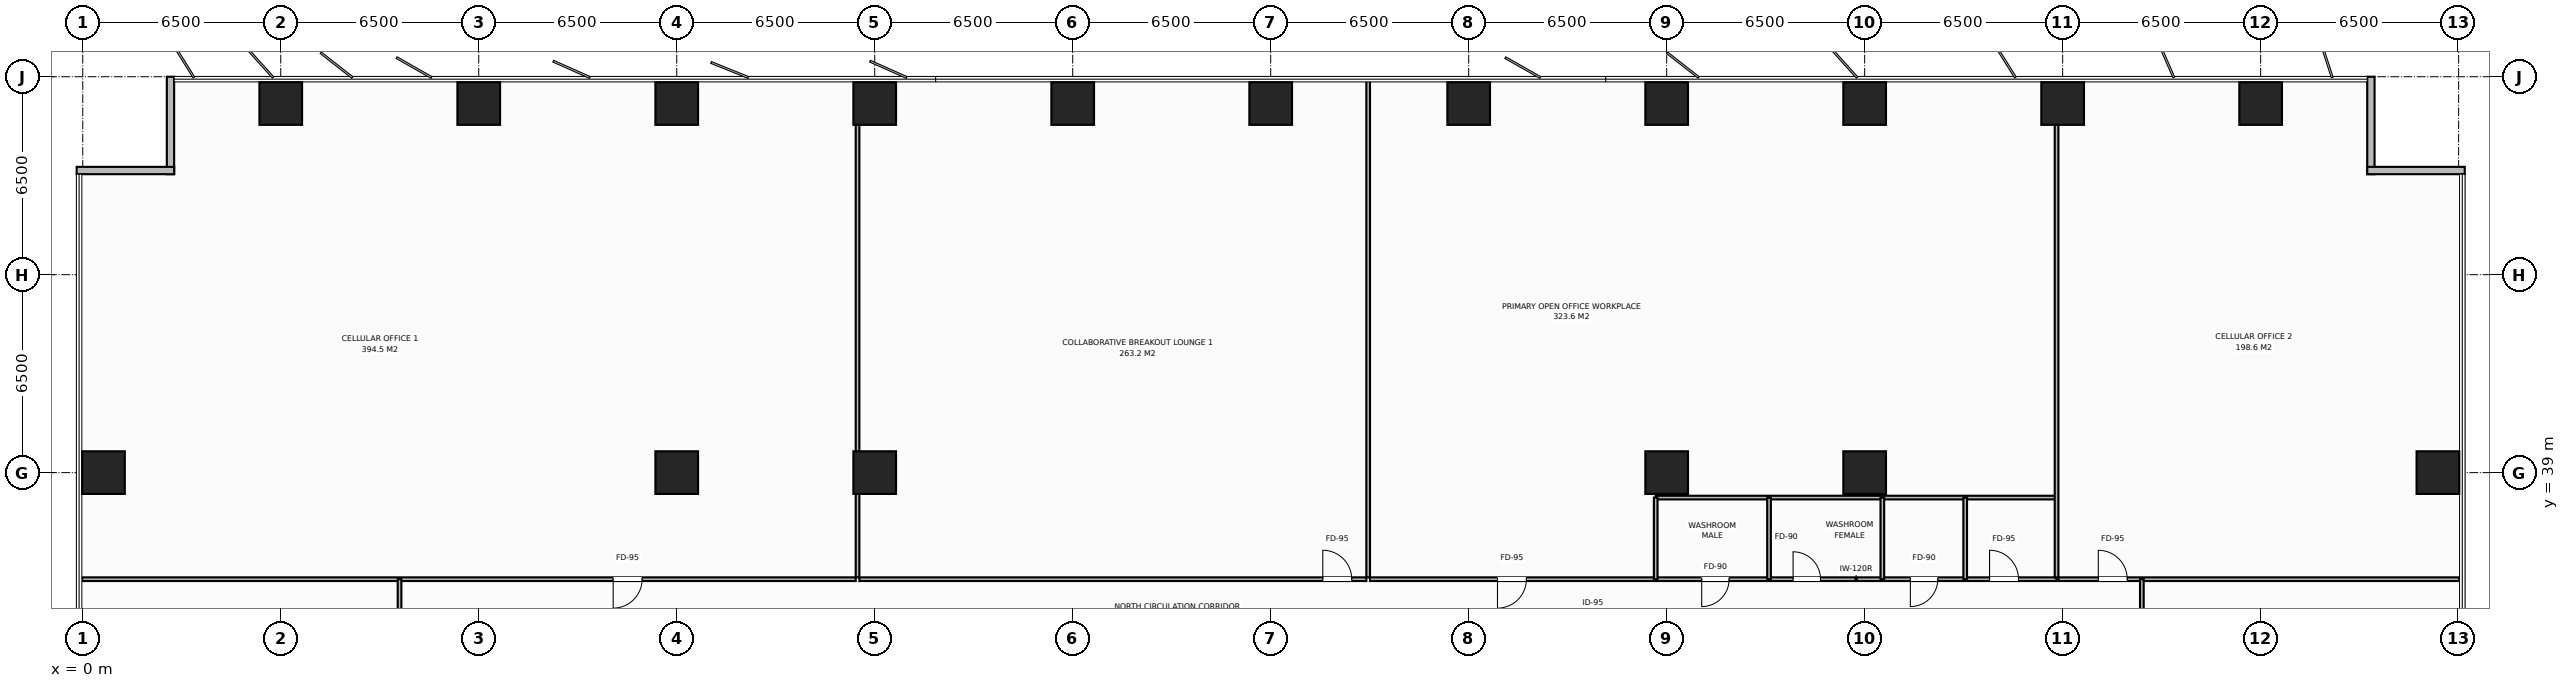
"""IFC4 building model, lengths in metres.
Left out: names, types, materials, properties, quantities, classifications, styles, units other than length and angle.
Written with IfcOpenShell. Run it as: python <this file> out.ifc"""

import sys

from ifc_helpers import new_model, si_unit, direction, frame, frame_2d, origin, origin_2d, place, context, subcontext, project, spatial, rectangle, extrude, element, fill, save


model = new_model("IFC4")
c1 = context("Model", 3, precision=1e-05, world=origin(), true_north=direction((0.0, 1.0)))
c2 = subcontext(c1, "Body", "Model", "MODEL_VIEW")
j1 = project(units=[si_unit("LENGTHUNIT", "METRE"), si_unit("PLANEANGLEUNIT", "RADIAN")], contexts=[c1])
p1 = place(None, origin())
s1 = spatial("IfcSite", under=j1, at=p1, CompositionType="ELEMENT")
p2 = place(p1, origin())
s2 = spatial("IfcBuilding", under=s1, at=p2, CompositionType="ELEMENT")
p3 = place(p2, frame((0.0, 0.0, 50.6)))
s3 = spatial("IfcBuildingStorey", under=s2, at=p3, CompositionType="ELEMENT", Elevation=50.6)
for number, where, z_axis, x_axis in (
    (1, (19.5, 39.0, 0.0), (0.0, 0.0, 1.0), (1.0, 0.0, 0.0)),
    (2, (58.5, 39.0, 0.0), (0.0, 0.0, 1.0), (1.0, 0.0, 0.0)),
    (3, (26.0, 39.0, 0.0), (0.0, 0.0, 1.0), (1.0, 0.0, 0.0)),
    (4, (52.0, 39.0, 0.0), (0.0, 0.0, 1.0), (1.0, 0.0, 0.0)),
    (5, (6.5, 51.12, 0.0), (0.0, 0.0, 1.0), (1.0, 0.0, 0.0)),
    (6, (13.0, 51.12, 0.0), (0.0, 0.0, 1.0), (1.0, 0.0, 0.0)),
    (7, (19.5, 51.12, 0.0), (0.0, 0.0, 1.0), (1.0, 0.0, 0.0)),
    (8, (26.0, 51.12, 0.0), (0.0, 0.0, 1.0), (1.0, 0.0, 0.0)),
    (9, (32.5, 51.12, 0.0), (0.0, 0.0, 1.0), (1.0, 0.0, 0.0)),
    (10, (39.0, 51.12, 0.0), (0.0, 0.0, 1.0), (1.0, 0.0, 0.0)),
    (11, (45.5, 51.12, 0.0), (0.0, 0.0, 1.0), (1.0, 0.0, 0.0)),
    (12, (52.0, 51.12, 0.0), (0.0, 0.0, 1.0), (1.0, 0.0, 0.0)),
    (13, (58.5, 51.12, 0.0), (0.0, 0.0, 1.0), (1.0, 0.0, 0.0)),
    (14, (65.0, 51.12, 0.0), (0.0, 0.0, 1.0), (1.0, 0.0, 0.0)),
    (15, (71.5, 51.12, 0.0), (0.0, 0.0, 1.0), (1.0, 0.0, 0.0)),
    (16, (0.68, 39.0, 0.0), (0.0, 0.0, 1.0), (1.0, 0.0, 0.0)),
    (17, (77.32, 39.0, 0.0), (0.0, 0.0, 1.0), (1.0, 0.0, 0.0)),
):
    element("IfcColumn", number, at=place(p3, frame(where, z_axis=z_axis, x_axis=x_axis)), inside=s3, PredefinedType="COLUMN", context=c2, shape_type="SweptSolid", body=[
        extrude(rectangle(XDim=1.4, YDim=1.4, at=origin_2d()), origin(), (0.0, 0.0, 1.0), 3.8),
    ])
for number, where, z_axis, x_axis in (
    (18, (2.88, 48.8, 0.0), (0.0, 0.0, 1.0), (0.0, 1.0, 0.0)),
    (19, (-0.2, 48.92, 0.0), (0.0, 0.0, 1.0), (1.0, 0.0, 0.0)),
    (20, (75.12, 52.0, 0.0), (0.0, 0.0, 1.0), (0.0, -1.0, 0.0)),
    (21, (75.0, 48.92, 0.0), (0.0, 0.0, 1.0), (1.0, 0.0, 0.0)),
):
    element("IfcWall", number, at=place(p3, frame(where, z_axis=z_axis, x_axis=x_axis)), inside=s3, PredefinedType="STANDARD", context=c2, shape_type="SweptSolid", body=[
        extrude(rectangle(XDim=3.2, YDim=0.24, at=frame_2d((1.6, 0.0))), origin(), (0.0, 0.0, 1.0), 3.55),
    ])
p4 = place(p3, frame((51.64, 35.5, 0.0), z_axis=(0.0, 0.0, 1.0), x_axis=(1.0, 0.0, 0.0)))
e22 = element("IfcWall", 22, at=p4, inside=s3, PredefinedType="PARTITIONING", context=c2, shape_type="SweptSolid", body=[
    extrude(rectangle(XDim=13.16, YDim=0.12, at=frame_2d((6.58, 0.0))), origin(), (0.0, 0.0, 1.0), 3.55),
])
p5 = place(p4, frame((1.51, 0.0, 0.0)))
e23 = element("IfcOpeningElement", 23, at=p5, cuts=e22, PredefinedType="OPENING", context=c2, shape_type="SweptSolid", body=[
    extrude(rectangle(XDim=0.9, YDim=2.15, at=frame_2d((0.45, 1.075))), frame((0.0, 0.07, 0.0), z_axis=(0.0, -1.0, 0.0), x_axis=(1.0, 0.0, 0.0)), (0.0, 0.0, 1.0), 0.14),
])
p6 = place(p4, frame((4.51, 0.0, 0.0)))
e24 = element("IfcOpeningElement", 24, at=p6, cuts=e22, PredefinedType="OPENING", context=c2, shape_type="SweptSolid", body=[
    extrude(rectangle(XDim=0.9, YDim=2.15, at=frame_2d((0.45, 1.075))), frame((0.0, 0.07, 0.0), z_axis=(0.0, -1.0, 0.0), x_axis=(1.0, 0.0, 0.0)), (0.0, 0.0, 1.0), 0.14),
])
p7 = place(p4, frame((8.36, 0.0, 0.0)))
e25 = element("IfcOpeningElement", 25, at=p7, cuts=e22, PredefinedType="OPENING", context=c2, shape_type="SweptSolid", body=[
    extrude(rectangle(XDim=0.9, YDim=2.15, at=frame_2d((0.45, 1.075))), frame((0.0, 0.07, 0.0), z_axis=(0.0, -1.0, 0.0), x_axis=(1.0, 0.0, 0.0)), (0.0, 0.0, 1.0), 0.14),
])
p8 = place(p4, frame((10.96, 0.0, 0.0)))
e26 = element("IfcOpeningElement", 26, at=p8, cuts=e22, PredefinedType="OPENING", context=c2, shape_type="SweptSolid", body=[
    extrude(rectangle(XDim=0.95, YDim=2.15, at=frame_2d((0.475, 1.075))), frame((0.0, 0.07, 0.0), z_axis=(0.0, -1.0, 0.0), x_axis=(1.0, 0.0, 0.0)), (0.0, 0.0, 1.0), 0.14),
])
p9 = place(p3, frame((51.64, 38.18, 0.0), z_axis=(0.0, 0.0, 1.0), x_axis=(1.0, 0.0, 0.0)))
e27 = element("IfcWall", 27, at=p9, inside=s3, PredefinedType="PARTITIONING", context=c2, shape_type="SweptSolid", body=[
    extrude(rectangle(XDim=13.16, YDim=0.12, at=frame_2d((6.58, 0.0))), origin(), (0.0, 0.0, 1.0), 3.55),
])
for number, where, z_axis, x_axis in (
    (28, (51.64, 35.5, 0.0), (0.0, 0.0, 1.0), (0.0, 1.0, 0.0)),
    (29, (55.36, 35.5, 0.0), (0.0, 0.0, 1.0), (0.0, 1.0, 0.0)),
    (30, (59.08, 35.5, 0.0), (0.0, 0.0, 1.0), (0.0, 1.0, 0.0)),
    (31, (61.8, 35.5, 0.0), (0.0, 0.0, 1.0), (0.0, 1.0, 0.0)),
):
    element("IfcWall", number, at=place(p3, frame(where, z_axis=z_axis, x_axis=x_axis)), inside=s3, PredefinedType="PARTITIONING", context=c2, shape_type="SweptSolid", body=[
        extrude(rectangle(XDim=2.68, YDim=0.12, at=frame_2d((1.34, 0.0))), origin(), (0.0, 0.0, 1.0), 3.55),
    ])
p10 = place(p3, frame((25.436, 35.56, 0.0), z_axis=(0.0, 0.0, 1.0), x_axis=(0.0, 1.0, 0.0)))
e32 = element("IfcWall", 32, at=p10, inside=s3, PredefinedType="PARTITIONING", context=c2, shape_type="SweptSolid", body=[
    extrude(rectangle(XDim=16.42, YDim=0.12, at=frame_2d((8.21, 0.0))), origin(), (0.0, 0.0, 1.0), 3.55),
])
p11 = place(p3, frame((-0.02, 35.5, 0.0), z_axis=(0.0, 0.0, 1.0), x_axis=(1.0, 0.0, 0.0)))
e33 = element("IfcWall", 33, at=p11, inside=s3, PredefinedType="PARTITIONING", context=c2, shape_type="SweptSolid", body=[
    extrude(rectangle(XDim=25.396, YDim=0.12, at=frame_2d((12.698, 0.0))), origin(), (0.0, 0.0, 1.0), 3.55),
])
p12 = place(p11, frame((17.433, 0.0, 0.0)))
e34 = element("IfcOpeningElement", 34, at=p12, cuts=e33, PredefinedType="OPENING", context=c2, shape_type="SweptSolid", body=[
    extrude(rectangle(XDim=0.95, YDim=2.15, at=frame_2d((0.475, 1.075))), frame((0.0, 0.07, 0.0), z_axis=(0.0, -1.0, 0.0), x_axis=(1.0, 0.0, 0.0)), (0.0, 0.0, 1.0), 0.14),
])
p13 = place(p3, frame((42.2, 35.56, 0.0), z_axis=(0.0, 0.0, 1.0), x_axis=(0.0, 1.0, 0.0)))
e35 = element("IfcWall", 35, at=p13, inside=s3, PredefinedType="PARTITIONING", context=c2, shape_type="SweptSolid", body=[
    extrude(rectangle(XDim=16.42, YDim=0.12, at=frame_2d((8.21, 0.0))), origin(), (0.0, 0.0, 1.0), 3.55),
])
p14 = place(p3, frame((25.496, 35.5, 0.0), z_axis=(0.0, 0.0, 1.0), x_axis=(1.0, 0.0, 0.0)))
e36 = element("IfcWall", 36, at=p14, inside=s3, PredefinedType="PARTITIONING", context=c2, shape_type="SweptSolid", body=[
    extrude(rectangle(XDim=16.644, YDim=0.12, at=frame_2d((8.322, 0.0))), origin(), (0.0, 0.0, 1.0), 3.55),
])
p15 = place(p14, frame((15.214, 0.0, 0.0)))
e37 = element("IfcOpeningElement", 37, at=p15, cuts=e36, PredefinedType="OPENING", context=c2, shape_type="SweptSolid", body=[
    extrude(rectangle(XDim=0.95, YDim=2.15, at=frame_2d((0.475, 1.075))), frame((0.0, 0.07, 0.0), z_axis=(0.0, -1.0, 0.0), x_axis=(1.0, 0.0, 0.0)), (0.0, 0.0, 1.0), 0.14),
])
p16 = place(p3, frame((64.8, 35.56, 0.0), z_axis=(0.0, 0.0, 1.0), x_axis=(0.0, 1.0, 0.0)))
e38 = element("IfcWall", 38, at=p16, inside=s3, PredefinedType="PARTITIONING", context=c2, shape_type="SweptSolid", body=[
    extrude(rectangle(XDim=16.42, YDim=0.12, at=frame_2d((8.21, 0.0))), origin(), (0.0, 0.0, 1.0), 2.9),
])
p17 = place(p3, frame((42.26, 35.5, 0.0), z_axis=(0.0, 0.0, 1.0), x_axis=(1.0, 0.0, 0.0)))
e39 = element("IfcWall", 39, at=p17, inside=s3, PredefinedType="PARTITIONING", context=c2, shape_type="SweptSolid", body=[
    extrude(rectangle(XDim=9.32, YDim=0.12, at=frame_2d((4.66, 0.0))), origin(), (0.0, 0.0, 1.0), 3.55),
])
p18 = place(p17, frame((4.185, 0.0, 0.0)))
e40 = element("IfcOpeningElement", 40, at=p18, cuts=e39, PredefinedType="OPENING", context=c2, shape_type="SweptSolid", body=[
    extrude(rectangle(XDim=0.95, YDim=2.15, at=frame_2d((0.475, 1.075))), frame((0.0, 0.07, 0.0), z_axis=(0.0, -1.0, 0.0), x_axis=(1.0, 0.0, 0.0)), (0.0, 0.0, 1.0), 0.14),
])
p19 = place(p3, frame((64.86, 35.5, 0.0), z_axis=(0.0, 0.0, 1.0), x_axis=(1.0, 0.0, 0.0)))
e41 = element("IfcWall", 41, at=p19, inside=s3, PredefinedType="PARTITIONING", context=c2, shape_type="SweptSolid", body=[
    extrude(rectangle(XDim=13.16, YDim=0.12, at=frame_2d((6.58, 0.0))), origin(), (0.0, 0.0, 1.0), 3.55),
])
p20 = place(p19, frame((1.31, 0.0, 0.0)))
e42 = element("IfcOpeningElement", 42, at=p20, cuts=e41, PredefinedType="OPENING", context=c2, shape_type="SweptSolid", body=[
    extrude(rectangle(XDim=0.95, YDim=2.15, at=frame_2d((0.475, 1.075))), frame((0.0, 0.07, 0.0), z_axis=(0.0, -1.0, 0.0), x_axis=(1.0, 0.0, 0.0)), (0.0, 0.0, 1.0), 0.14),
])
p21 = place(p3, frame((10.4, 29.167, 0.0), z_axis=(0.0, 0.0, 1.0), x_axis=(0.0, 1.0, 0.0)))
e43 = element("IfcWall", 43, at=p21, inside=s3, PredefinedType="PARTITIONING", context=c2, shape_type="SweptSolid", body=[
    extrude(rectangle(XDim=6.333, YDim=0.12, at=frame_2d((3.167, 0.0))), origin(), (0.0, 0.0, 1.0), 3.55),
])
p22 = place(p21, frame((1.642, 0.0, 0.0)))
e44 = element("IfcOpeningElement", 44, at=p22, cuts=e43, PredefinedType="OPENING", context=c2, shape_type="SweptSolid", body=[
    extrude(rectangle(XDim=0.95, YDim=2.15, at=frame_2d((0.475, 1.075))), frame((0.0, 0.07, 0.0), z_axis=(0.0, -1.0, 0.0), x_axis=(1.0, 0.0, 0.0)), (0.0, 0.0, 1.0), 0.14),
])
p23 = place(p3, frame((67.6, 16.5, 0.0), z_axis=(0.0, 0.0, 1.0), x_axis=(0.0, 1.0, 0.0)))
e45 = element("IfcWall", 45, at=p23, inside=s3, PredefinedType="PARTITIONING", context=c2, shape_type="SweptSolid", body=[
    extrude(rectangle(XDim=19.0, YDim=0.12, at=frame_2d((9.5, 0.0))), origin(), (0.0, 0.0, 1.0), 3.55),
])
p24 = place(p23, frame((9.025, 0.0, 0.0)))
e46 = element("IfcOpeningElement", 46, at=p24, cuts=e45, PredefinedType="OPENING", context=c2, shape_type="SweptSolid", body=[
    extrude(rectangle(XDim=0.95, YDim=2.15, at=frame_2d((0.475, 1.075))), frame((0.0, 0.07, 0.0), z_axis=(0.0, -1.0, 0.0), x_axis=(1.0, 0.0, 0.0)), (0.0, 0.0, 1.0), 0.14),
])
p25 = place(p5, origin())
e47 = element("IfcDoor", 47, at=p25, inside=s3, OperationType="SINGLE_SWING_RIGHT", PredefinedType="DOOR", context=c2, shape_type="SweptSolid", body=[
    extrude(rectangle(XDim=0.9, YDim=2.15, at=frame_2d((0.45, 1.075))), frame((0.0, 0.025, 0.0), z_axis=(0.0, -1.0, 0.0), x_axis=(1.0, 0.0, 0.0)), (0.0, 0.0, 1.0), 0.05),
])
fill(e23, e47)
p26 = place(p6, origin())
e48 = element("IfcDoor", 48, at=p26, inside=s3, OperationType="SINGLE_SWING_LEFT", PredefinedType="DOOR", context=c2, shape_type="SweptSolid", body=[
    extrude(rectangle(XDim=0.9, YDim=2.15, at=frame_2d((0.45, 1.075))), frame((0.0, 0.025, 0.0), z_axis=(0.0, -1.0, 0.0), x_axis=(1.0, 0.0, 0.0)), (0.0, 0.0, 1.0), 0.05),
])
fill(e24, e48)
p27 = place(p7, origin())
e49 = element("IfcDoor", 49, at=p27, inside=s3, OperationType="SINGLE_SWING_RIGHT", PredefinedType="DOOR", context=c2, shape_type="SweptSolid", body=[
    extrude(rectangle(XDim=0.9, YDim=2.15, at=frame_2d((0.45, 1.075))), frame((0.0, 0.025, 0.0), z_axis=(0.0, -1.0, 0.0), x_axis=(1.0, 0.0, 0.0)), (0.0, 0.0, 1.0), 0.05),
])
fill(e25, e49)
p28 = place(p8, origin())
e50 = element("IfcDoor", 50, at=p28, inside=s3, OperationType="SINGLE_SWING_LEFT", PredefinedType="DOOR", context=c2, shape_type="SweptSolid", body=[
    extrude(rectangle(XDim=0.95, YDim=2.15, at=frame_2d((0.475, 1.075))), frame((0.0, 0.025, 0.0), z_axis=(0.0, -1.0, 0.0), x_axis=(1.0, 0.0, 0.0)), (0.0, 0.0, 1.0), 0.05),
])
fill(e26, e50)
p29 = place(p12, origin())
e51 = element("IfcDoor", 51, at=p29, inside=s3, OperationType="SINGLE_SWING_RIGHT", PredefinedType="DOOR", context=c2, shape_type="SweptSolid", body=[
    extrude(rectangle(XDim=0.95, YDim=2.15, at=frame_2d((0.475, 1.075))), frame((0.0, 0.025, 0.0), z_axis=(0.0, -1.0, 0.0), x_axis=(1.0, 0.0, 0.0)), (0.0, 0.0, 1.0), 0.05),
])
fill(e34, e51)
p30 = place(p15, origin())
e52 = element("IfcDoor", 52, at=p30, inside=s3, OperationType="SINGLE_SWING_LEFT", PredefinedType="DOOR", context=c2, shape_type="SweptSolid", body=[
    extrude(rectangle(XDim=0.95, YDim=2.15, at=frame_2d((0.475, 1.075))), frame((0.0, 0.025, 0.0), z_axis=(0.0, -1.0, 0.0), x_axis=(1.0, 0.0, 0.0)), (0.0, 0.0, 1.0), 0.05),
])
fill(e37, e52)
p31 = place(p18, origin())
e53 = element("IfcDoor", 53, at=p31, inside=s3, OperationType="SINGLE_SWING_RIGHT", PredefinedType="DOOR", context=c2, shape_type="SweptSolid", body=[
    extrude(rectangle(XDim=0.95, YDim=2.15, at=frame_2d((0.475, 1.075))), frame((0.0, 0.025, 0.0), z_axis=(0.0, -1.0, 0.0), x_axis=(1.0, 0.0, 0.0)), (0.0, 0.0, 1.0), 0.05),
])
fill(e40, e53)
p32 = place(p20, origin())
e54 = element("IfcDoor", 54, at=p32, inside=s3, OperationType="SINGLE_SWING_LEFT", PredefinedType="DOOR", context=c2, shape_type="SweptSolid", body=[
    extrude(rectangle(XDim=0.95, YDim=2.15, at=frame_2d((0.475, 1.075))), frame((0.0, 0.025, 0.0), z_axis=(0.0, -1.0, 0.0), x_axis=(1.0, 0.0, 0.0)), (0.0, 0.0, 1.0), 0.05),
])
fill(e42, e54)
save(model, sys.argv[1])
